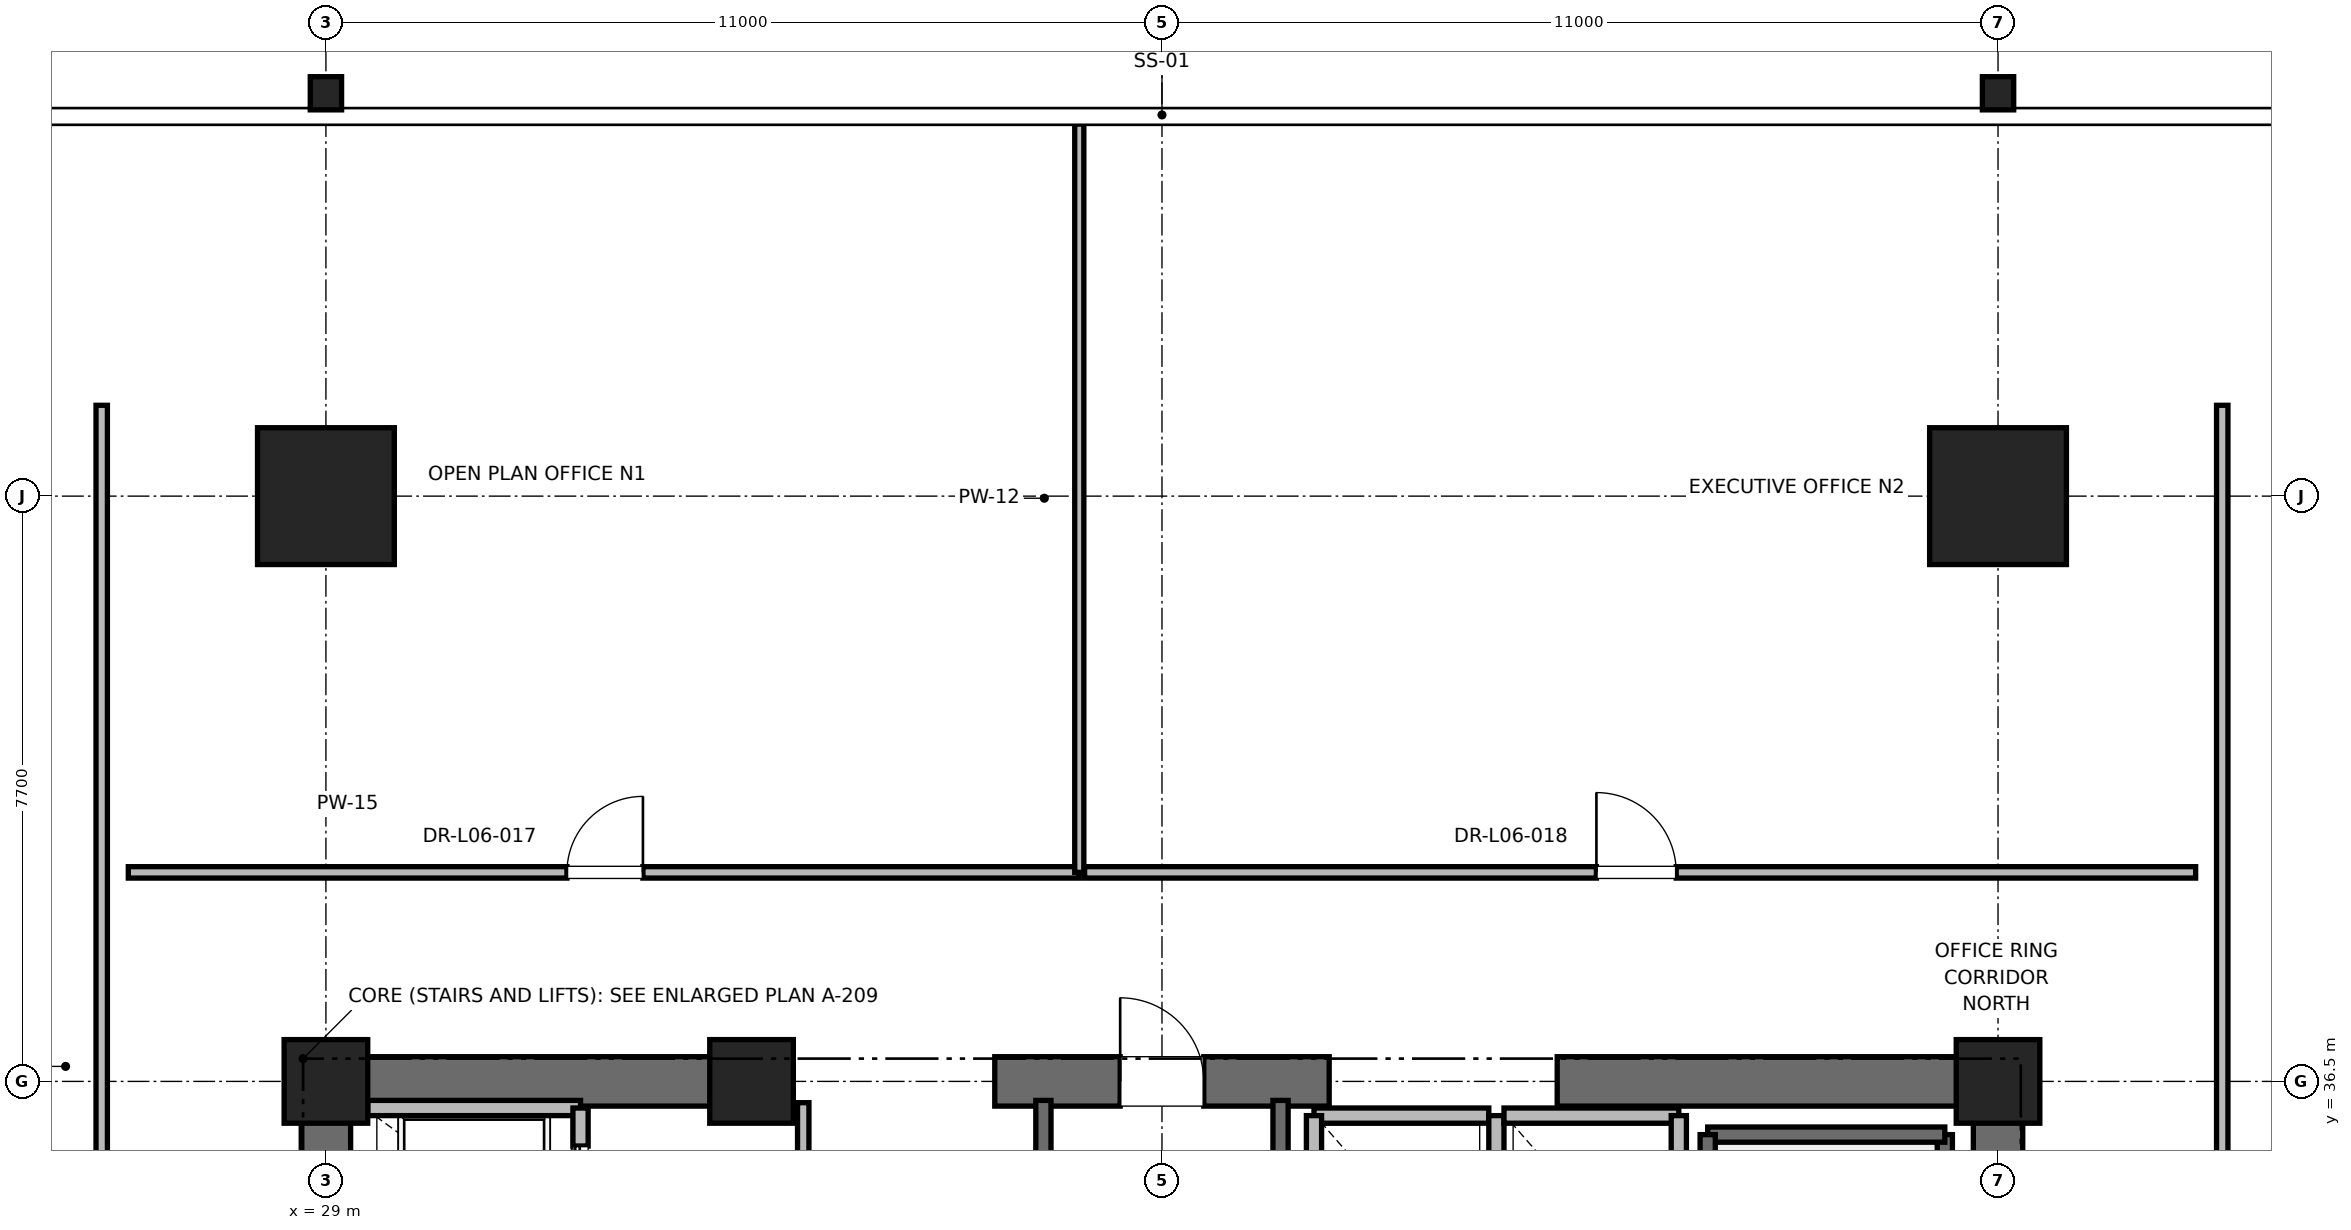
"""IFC4 building model, lengths in metres.
Left out: names, types, materials, properties, quantities, classifications, styles, units other than length and angle.
Written with IfcOpenShell. Run it as: python <this file> out.ifc"""

import sys

from ifc_helpers import new_model, si_unit, direction, frame, frame_2d, origin, origin_2d, place, context, subcontext, project, spatial, rectangle, i_section, extrude, element, fill, save


model = new_model("IFC4")
c1 = context("Model", 3, precision=1e-05, world=origin(), true_north=direction((0.0, 1.0)))
c2 = subcontext(c1, "Body", "Model", "MODEL_VIEW")
j1 = project(units=[si_unit("LENGTHUNIT", "METRE"), si_unit("PLANEANGLEUNIT", "RADIAN")], contexts=[c1])
p1 = place(None, origin())
s1 = spatial("IfcSite", under=j1, at=p1, CompositionType="ELEMENT")
p2 = place(p1, origin())
s2 = spatial("IfcBuilding", under=s1, at=p2, CompositionType="ELEMENT")
p3 = place(p2, frame((0.0, 0.0, 31.6)))
s3 = spatial("IfcBuildingStorey", under=s2, at=p3, CompositionType="ELEMENT", Elevation=31.6)
for number, where, z_axis, x_axis in (
    (1, (29.0, 44.2, 0.0), (0.0, 0.0, 1.0), (1.0, 0.0, 0.0)),
    (2, (51.0, 44.2, 0.0), (0.0, 0.0, 1.0), (1.0, 0.0, 0.0)),
):
    element("IfcColumn", number, at=place(p3, frame(where, z_axis=z_axis, x_axis=x_axis)), inside=s3, PredefinedType="COLUMN", context=c2, shape_type="SweptSolid", body=[
        extrude(rectangle(XDim=1.8, YDim=1.8, at=origin_2d()), origin(), (0.0, 0.0, 1.0), 4.0),
    ])
for number, where, z_axis, x_axis in (
    (3, (29.0, 49.5, 0.0), (0.0, 0.0, 1.0), (1.0, 0.0, 0.0)),
    (4, (51.0, 49.5, 0.0), (0.0, 0.0, 1.0), (1.0, 0.0, 0.0)),
):
    element("IfcColumn", number, at=place(p3, frame(where, z_axis=z_axis, x_axis=x_axis)), inside=s3, PredefinedType="COLUMN", context=c2, shape_type="SweptSolid", body=[
        extrude(i_section(OverallWidth=0.412, OverallDepth=0.437, WebThickness=0.036, FlangeThickness=0.058, FilletRadius=0.015, at=origin_2d()), origin(), (0.0, 0.0, 1.0), 4.0),
    ])
for number, where, z_axis, x_axis in (
    (5, (29.0, 36.5, 0.0), (0.0, 0.0, 1.0), (1.0, 0.0, 0.0)),
    (6, (51.0, 36.5, 0.0), (0.0, 0.0, 1.0), (1.0, 0.0, 0.0)),
    (7, (34.6, 36.5, 0.0), (0.0, 0.0, 1.0), (1.0, 0.0, 0.0)),
):
    element("IfcColumn", number, at=place(p3, frame(where, z_axis=z_axis, x_axis=x_axis)), inside=s3, PredefinedType="PILASTER", context=c2, shape_type="SweptSolid", body=[
        extrude(rectangle(XDim=1.1, YDim=1.1, at=origin_2d()), origin(), (0.0, 0.0, 1.0), 4.0),
    ])
p4 = place(p3, frame((29.0, 36.5, 0.0), z_axis=(0.0, 0.0, 1.0), x_axis=(1.0, 0.0, 0.0)))
e8 = element("IfcWall", 8, at=p4, inside=s3, PredefinedType="SHEAR", context=c2, shape_type="SweptSolid", body=[
    extrude(rectangle(XDim=5.8, YDim=0.65, at=frame_2d((2.9, 0.0))), origin(), (0.0, 0.0, 1.0), 3.76),
])
p5 = place(p3, frame((37.8, 36.5, 0.0), z_axis=(0.0, 0.0, 1.0), x_axis=(1.0, 0.0, 0.0)))
e9 = element("IfcWall", 9, at=p5, inside=s3, PredefinedType="SHEAR", context=c2, shape_type="SweptSolid", body=[
    extrude(rectangle(XDim=4.4, YDim=0.65, at=frame_2d((2.2, 0.0))), origin(), (0.0, 0.0, 1.0), 3.76),
])
p6 = place(p5, frame((1.65, 0.0, 0.0)))
e10 = element("IfcOpeningElement", 10, at=p6, cuts=e9, PredefinedType="OPENING", context=c2, shape_type="SweptSolid", body=[
    extrude(rectangle(XDim=1.1, YDim=2.15, at=frame_2d((0.55, 1.075))), frame((0.0, 0.325, 0.0), z_axis=(0.0, -1.0, 0.0), x_axis=(1.0, 0.0, 0.0)), (0.0, 0.0, 1.0), 0.65),
])
for number, where, z_axis, x_axis in (
    (11, (45.2, 36.5, 0.0), (0.0, 0.0, 1.0), (1.0, 0.0, 0.0)),
    (12, (29.0, 30.7, 0.0), (0.0, 0.0, 1.0), (0.0, 1.0, 0.0)),
):
    element("IfcWall", number, at=place(p3, frame(where, z_axis=z_axis, x_axis=x_axis)), inside=s3, PredefinedType="SHEAR", context=c2, shape_type="SweptSolid", body=[
        extrude(rectangle(XDim=5.8, YDim=0.65, at=frame_2d((2.9, 0.0))), origin(), (0.0, 0.0, 1.0), 3.76),
    ])
p7 = place(p3, frame((51.0, 27.7, 0.0), z_axis=(0.0, 0.0, 1.0), x_axis=(0.0, 1.0, 0.0)))
e13 = element("IfcWall", 13, at=p7, inside=s3, PredefinedType="SHEAR", context=c2, shape_type="SweptSolid", body=[
    extrude(rectangle(XDim=8.8, YDim=0.65, at=frame_2d((4.4, 0.0))), origin(), (0.0, 0.0, 1.0), 3.76),
])
p8 = place(p3, frame((50.3, 27.65, 0.0), z_axis=(0.0, 0.0, 1.0), x_axis=(0.0, 1.0, 0.0)))
e14 = element("IfcWall", 14, at=p8, inside=s3, PredefinedType="SOLIDWALL", context=c2, shape_type="SweptSolid", body=[
    extrude(rectangle(XDim=8.15, YDim=0.2, at=frame_2d((4.075, 0.0))), origin(), (0.0, 0.0, 1.0), 3.76),
])
p9 = place(p3, frame((47.18, 35.8, 0.0), z_axis=(0.0, 0.0, 1.0), x_axis=(1.0, 0.0, 0.0)))
e15 = element("IfcWall", 15, at=p9, inside=s3, PredefinedType="SOLIDWALL", context=c2, shape_type="SweptSolid", body=[
    extrude(rectangle(XDim=3.12, YDim=0.2, at=frame_2d((1.56, 0.0))), origin(), (0.0, 0.0, 1.0), 3.76),
])
p10 = place(p3, frame((47.18, 27.62, 0.0), z_axis=(0.0, 0.0, 1.0), x_axis=(0.0, 1.0, 0.0)))
e16 = element("IfcWall", 16, at=p10, inside=s3, PredefinedType="SOLIDWALL", context=c2, shape_type="SweptSolid", body=[
    extrude(rectangle(XDim=8.18, YDim=0.2, at=frame_2d((4.09, 0.0))), origin(), (0.0, 0.0, 1.0), 3.76),
])
p11 = place(p3, frame((38.44, 27.38, 0.0), z_axis=(0.0, 0.0, 1.0), x_axis=(0.0, 1.0, 0.0)))
e17 = element("IfcWall", 17, at=p11, inside=s3, PredefinedType="SOLIDWALL", context=c2, shape_type="SweptSolid", body=[
    extrude(rectangle(XDim=8.87, YDim=0.2, at=frame_2d((4.435, 0.0))), origin(), (0.0, 0.0, 1.0), 3.76),
])
p12 = place(p3, frame((41.56, 27.68, 0.0), z_axis=(0.0, 0.0, 1.0), x_axis=(0.0, 1.0, 0.0)))
e18 = element("IfcWall", 18, at=p12, inside=s3, PredefinedType="SOLIDWALL", context=c2, shape_type="SweptSolid", body=[
    extrude(rectangle(XDim=8.57, YDim=0.2, at=frame_2d((4.285, 0.0))), origin(), (0.0, 0.0, 1.0), 3.76),
])
p13 = place(p3, frame((32.35, 36.15, 0.0), z_axis=(0.0, 0.0, 1.0), x_axis=(-1.0, 0.0, 0.0)))
e19 = element("IfcWall", 19, at=p13, inside=s3, PredefinedType="SOLIDWALL", context=c2, shape_type="SweptSolid", body=[
    extrude(rectangle(XDim=2.8, YDim=0.2, at=frame_2d((1.4, 0.0))), origin(), (0.0, 0.0, 1.0), 2.889),
])
p14 = place(p3, frame((32.35, 34.05, 0.0), z_axis=(0.0, 0.0, 1.0), x_axis=(0.0, 1.0, 0.0)))
e20 = element("IfcWall", 20, at=p14, inside=s3, PredefinedType="SOLIDWALL", context=c2, shape_type="SweptSolid", body=[
    extrude(rectangle(XDim=2.1, YDim=0.2, at=frame_2d((1.05, 0.0))), origin(), (0.0, 0.0, 1.0), 3.76),
])
p15 = place(p14, frame((0.5, 0.0, 0.0)))
e21 = element("IfcOpeningElement", 21, at=p15, cuts=e20, PredefinedType="OPENING", context=c2, shape_type="SweptSolid", body=[
    extrude(rectangle(XDim=1.1, YDim=2.2, at=frame_2d((0.55, 1.1))), frame((0.0, 0.1, 0.0), z_axis=(0.0, -1.0, 0.0), x_axis=(1.0, 0.0, 0.0)), (0.0, 0.0, 1.0), 0.2),
])
p16 = place(p3, frame((44.3, 36.05, 0.0), z_axis=(0.0, 0.0, 1.0), x_axis=(-1.0, 0.0, 0.0)))
e22 = element("IfcWall", 22, at=p16, inside=s3, PredefinedType="SOLIDWALL", context=c2, shape_type="SweptSolid", body=[
    extrude(rectangle(XDim=2.3, YDim=0.2, at=frame_2d((1.15, 0.0))), origin(), (0.0, 0.0, 1.0), 2.54),
])
for number, where, z_axis, x_axis in (
    (23, (42.0, 36.05, 0.0), (0.0, 0.0, 1.0), (0.0, -1.0, 0.0)),
    (24, (44.4, 33.45, 0.0), (0.0, 0.0, 1.0), (0.0, 1.0, 0.0)),
):
    element("IfcWall", number, at=place(p3, frame(where, z_axis=z_axis, x_axis=x_axis)), inside=s3, PredefinedType="SOLIDWALL", context=c2, shape_type="SweptSolid", body=[
        extrude(rectangle(XDim=2.6, YDim=0.2, at=frame_2d((1.3, 0.0))), origin(), (0.0, 0.0, 1.0), 2.54),
    ])
p17 = place(p3, frame((46.8, 36.05, 0.0), z_axis=(0.0, 0.0, 1.0), x_axis=(-1.0, 0.0, 0.0)))
e25 = element("IfcWall", 25, at=p17, inside=s3, PredefinedType="SOLIDWALL", context=c2, shape_type="SweptSolid", body=[
    extrude(rectangle(XDim=2.3, YDim=0.2, at=frame_2d((1.15, 0.0))), origin(), (0.0, 0.0, 1.0), 2.54),
])
p18 = place(p3, frame((46.8, 33.45, 0.0), z_axis=(0.0, 0.0, 1.0), x_axis=(0.0, 1.0, 0.0)))
e26 = element("IfcWall", 26, at=p18, inside=s3, PredefinedType="SOLIDWALL", context=c2, shape_type="SweptSolid", body=[
    extrude(rectangle(XDim=2.6, YDim=0.2, at=frame_2d((1.3, 0.0))), origin(), (0.0, 0.0, 1.0), 3.76),
])
p19 = place(p3, frame((35.28, 33.95, 0.0), z_axis=(0.0, 0.0, 1.0), x_axis=(0.0, 1.0, 0.0)))
e27 = element("IfcWall", 27, at=p19, inside=s3, PredefinedType="PARTITIONING", context=c2, shape_type="SweptSolid", body=[
    extrude(rectangle(XDim=2.27, YDim=0.15, at=frame_2d((1.135, 0.0))), origin(), (0.0, 0.0, 1.0), 2.54),
])
p20 = place(p19, frame((0.66, 0.0, 0.0)))
e28 = element("IfcOpeningElement", 28, at=p20, cuts=e27, PredefinedType="OPENING", context=c2, shape_type="SweptSolid", body=[
    extrude(rectangle(XDim=0.95, YDim=2.15, at=frame_2d((0.475, 1.075))), frame((0.0, 0.075, 0.0), z_axis=(0.0, -1.0, 0.0), x_axis=(1.0, 0.0, 0.0)), (0.0, 0.0, 1.0), 0.15),
])
p21 = place(p3, frame((26.4, 39.25, 0.0), z_axis=(0.0, 0.0, 1.0), x_axis=(1.0, 0.0, 0.0)))
e29 = element("IfcWall", 29, at=p21, inside=s3, PredefinedType="PARTITIONING", context=c2, shape_type="SweptSolid", body=[
    extrude(rectangle(XDim=12.512, YDim=0.15, at=frame_2d((6.256, 0.0))), origin(), (0.0, 0.0, 1.0), 2.85),
])
p22 = place(p21, frame((5.771, 0.0, 0.0)))
e30 = element("IfcOpeningElement", 30, at=p22, cuts=e29, PredefinedType="OPENING", context=c2, shape_type="SweptSolid", body=[
    extrude(rectangle(XDim=1.0, YDim=2.15, at=frame_2d((0.5, 1.075))), frame((0.0, 0.075, 0.0), z_axis=(0.0, -1.0, 0.0), x_axis=(1.0, 0.0, 0.0)), (0.0, 0.0, 1.0), 0.15),
])
p23 = place(p3, frame((38.912, 39.25, 0.0), z_axis=(0.0, 0.0, 1.0), x_axis=(0.0, 1.0, 0.0)))
e31 = element("IfcWall", 31, at=p23, inside=s3, PredefinedType="PARTITIONING", context=c2, shape_type="SweptSolid", body=[
    extrude(rectangle(XDim=9.845, YDim=0.12, at=frame_2d((4.922, 0.0))), origin(), (0.0, 0.0, 1.0), 2.39),
])
p24 = place(p3, frame((38.982, 39.25, 0.0), z_axis=(0.0, 0.0, 1.0), x_axis=(1.0, 0.0, 0.0)))
e32 = element("IfcWall", 32, at=p24, inside=s3, PredefinedType="PARTITIONING", context=c2, shape_type="SweptSolid", body=[
    extrude(rectangle(XDim=14.618, YDim=0.15, at=frame_2d((7.309, 0.0))), origin(), (0.0, 0.0, 1.0), 2.85),
])
p25 = place(p24, frame((6.734, 0.0, 0.0)))
e33 = element("IfcOpeningElement", 33, at=p25, cuts=e32, PredefinedType="OPENING", context=c2, shape_type="SweptSolid", body=[
    extrude(rectangle(XDim=1.05, YDim=2.2, at=frame_2d((0.525, 1.1))), frame((0.0, 0.075, 0.0), z_axis=(0.0, -1.0, 0.0), x_axis=(1.0, 0.0, 0.0)), (0.0, 0.0, 1.0), 0.15),
])
p26 = place(p3, frame((26.05, 9.605, 0.0), z_axis=(0.0, 0.0, 1.0), x_axis=(0.0, 1.0, 0.0)))
e34 = element("IfcWall", 34, at=p26, inside=s3, PredefinedType="PARTITIONING", context=c2, shape_type="SweptSolid", body=[
    extrude(rectangle(XDim=35.79, YDim=0.15, at=frame_2d((17.895, 0.0))), origin(), (0.0, 0.0, 1.0), 2.85),
])
p27 = place(p26, frame((17.395, 0.0, 0.0)))
e35 = element("IfcOpeningElement", 35, at=p27, cuts=e34, PredefinedType="OPENING", context=c2, shape_type="SweptSolid", body=[
    extrude(rectangle(XDim=1.0, YDim=2.15, at=frame_2d((0.5, 1.075))), frame((0.0, 0.075, 0.0), z_axis=(0.0, -1.0, 0.0), x_axis=(1.0, 0.0, 0.0)), (0.0, 0.0, 1.0), 0.15),
])
p28 = place(p3, frame((53.95, 24.707, 0.0), z_axis=(0.0, 0.0, 1.0), x_axis=(0.0, 1.0, 0.0)))
e36 = element("IfcWall", 36, at=p28, inside=s3, PredefinedType="PARTITIONING", context=c2, shape_type="SweptSolid", body=[
    extrude(rectangle(XDim=20.688, YDim=0.15, at=frame_2d((10.344, 0.0))), origin(), (0.0, 0.0, 1.0), 2.85),
])
p29 = place(p28, frame((5.347, 0.0, 0.0)))
e37 = element("IfcOpeningElement", 37, at=p29, cuts=e36, PredefinedType="OPENING", context=c2, shape_type="SweptSolid", body=[
    extrude(rectangle(XDim=1.0, YDim=2.15, at=frame_2d((0.5, 1.075))), frame((0.0, 0.075, 0.0), z_axis=(0.0, -1.0, 0.0), x_axis=(1.0, 0.0, 0.0)), (0.0, 0.0, 1.0), 0.15),
])
p30 = place(p6, origin())
e38 = element("IfcDoor", 38, at=p30, inside=s3, OperationType="SINGLE_SWING_LEFT", PredefinedType="DOOR", context=c2, shape_type="SweptSolid", body=[
    extrude(rectangle(XDim=1.1, YDim=2.15, at=frame_2d((0.55, 1.075))), frame((0.0, 0.025, 0.0), z_axis=(0.0, -1.0, 0.0), x_axis=(1.0, 0.0, 0.0)), (0.0, 0.0, 1.0), 0.05),
])
fill(e10, e38)
p31 = place(p15, origin())
e39 = element("IfcDoor", 39, at=p31, inside=s3, OperationType="SLIDING_TO_RIGHT", PredefinedType="DOOR", context=c2, shape_type="SweptSolid", body=[
    extrude(rectangle(XDim=1.1, YDim=2.2, at=frame_2d((0.55, 1.1))), frame((0.0, 0.025, 0.0), z_axis=(0.0, -1.0, 0.0), x_axis=(1.0, 0.0, 0.0)), (0.0, 0.0, 1.0), 0.05),
])
fill(e21, e39)
p32 = place(p22, origin())
e40 = element("IfcDoor", 40, at=p32, inside=s3, OperationType="SINGLE_SWING_RIGHT", PredefinedType="DOOR", context=c2, shape_type="SweptSolid", body=[
    extrude(rectangle(XDim=1.0, YDim=2.15, at=frame_2d((0.5, 1.075))), frame((0.0, 0.025, 0.0), z_axis=(0.0, -1.0, 0.0), x_axis=(1.0, 0.0, 0.0)), (0.0, 0.0, 1.0), 0.05),
])
fill(e30, e40)
p33 = place(p25, origin())
e41 = element("IfcDoor", 41, at=p33, inside=s3, OperationType="SINGLE_SWING_LEFT", PredefinedType="DOOR", context=c2, shape_type="SweptSolid", body=[
    extrude(rectangle(XDim=1.05, YDim=2.2, at=frame_2d((0.525, 1.1))), frame((0.0, 0.025, 0.0), z_axis=(0.0, -1.0, 0.0), x_axis=(1.0, 0.0, 0.0)), (0.0, 0.0, 1.0), 0.05),
])
fill(e33, e41)
save(model, sys.argv[1])
